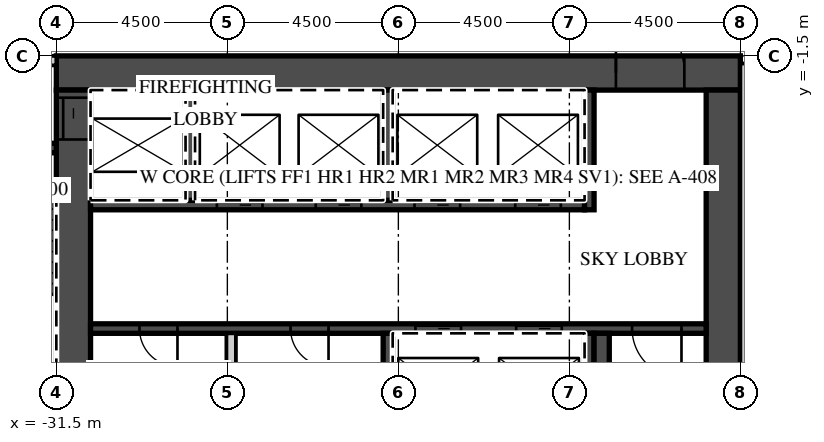
"""IFC4 building model, lengths in metres.
Left out: names, types, materials, properties, quantities, classifications, styles, units other than length and angle.
Written with IfcOpenShell. Run it as: python <this file> out.ifc"""

import sys

from ifc_helpers import new_model, si_unit, direction, frame, frame_2d, origin, place, context, subcontext, project, spatial, rectangle, extrude, element, fill, save


model = new_model("IFC4")
c1 = context("Model", 3, precision=1e-05, world=origin(), true_north=direction((0.0, 1.0)))
c2 = subcontext(c1, "Body", "Model", "MODEL_VIEW")
j1 = project(units=[si_unit("LENGTHUNIT", "METRE"), si_unit("PLANEANGLEUNIT", "RADIAN")], contexts=[c1])
p1 = place(None, origin())
s1 = spatial("IfcSite", under=j1, at=p1, CompositionType="ELEMENT")
p2 = place(p1, origin())
s2 = spatial("IfcBuilding", under=s1, at=p2, CompositionType="ELEMENT")
p3 = place(p2, frame((0.0, 0.0, 261.9)))
s3 = spatial("IfcBuildingStorey", under=s2, at=p3, CompositionType="ELEMENT", Elevation=261.9)
p4 = place(p3, frame((-31.5, -1.95, 0.0), z_axis=(0.0, 0.0, 1.0), x_axis=(1.0, 0.0, 0.0)))
e1 = element("IfcWall", 1, at=p4, inside=s3, PredefinedType="SHEAR", context=c2, shape_type="SweptSolid", body=[
    extrude(rectangle(XDim=18.0, YDim=0.9, at=frame_2d((9.0, 0.0))), origin(), (0.0, 0.0, 1.0), 6.32),
])
p5 = place(p4, frame((14.725, 0.0, 0.0)))
e2 = element("IfcOpeningElement", 2, at=p5, cuts=e1, PredefinedType="OPENING", context=c2, shape_type="SweptSolid", body=[
    extrude(rectangle(XDim=1.8, YDim=2.1, at=frame_2d((0.9, 1.05))), frame((0.0, 0.46, 0.0), z_axis=(0.0, -1.0, 0.0), x_axis=(1.0, 0.0, 0.0)), (0.0, 0.0, 1.0), 0.92),
])
p6 = place(p3, frame((-31.05, -15.2, 0.0), z_axis=(0.0, 0.0, 1.0), x_axis=(0.0, 1.0, 0.0)))
e3 = element("IfcWall", 3, at=p6, inside=s3, PredefinedType="SHEAR", context=c2, shape_type="SweptSolid", body=[
    extrude(rectangle(XDim=12.8, YDim=0.9, at=frame_2d((6.4, 0.0))), origin(), (0.0, 0.0, 1.0), 6.32),
])
p7 = place(p6, frame((11.5, 0.0, 0.0)))
e4 = element("IfcOpeningElement", 4, at=p7, cuts=e3, PredefinedType="OPENING", context=c2, shape_type="SweptSolid", body=[
    extrude(rectangle(XDim=1.1, YDim=2.1, at=frame_2d((0.55, 1.05))), frame((0.0, 0.46, 0.0), z_axis=(0.0, -1.0, 0.0), x_axis=(1.0, 0.0, 0.0)), (0.0, 0.0, 1.0), 0.92),
])
p8 = place(p3, frame((-13.95, -14.6, 0.0), z_axis=(0.0, 0.0, 1.0), x_axis=(0.0, 1.0, 0.0)))
e5 = element("IfcWall", 5, at=p8, inside=s3, PredefinedType="SHEAR", context=c2, shape_type="SweptSolid", body=[
    extrude(rectangle(XDim=12.2, YDim=0.9, at=frame_2d((6.1, 0.0))), origin(), (0.0, 0.0, 1.0), 6.32),
])
p9 = place(p3, frame((-30.6, -5.425, 0.0), z_axis=(0.0, 0.0, 1.0), x_axis=(1.0, 0.0, 0.0)))
e6 = element("IfcWall", 6, at=p9, inside=s3, PredefinedType="SHEAR", context=c2, shape_type="SweptSolid", body=[
    extrude(rectangle(XDim=13.0, YDim=0.25, at=frame_2d((6.5, 0.0))), origin(), (0.0, 0.0, 1.0), 6.32),
])
p10 = place(p9, frame((3.325, 0.0, 0.0)))
e7 = element("IfcOpeningElement", 7, at=p10, cuts=e6, PredefinedType="OPENING", context=c2, shape_type="SweptSolid", body=[
    extrude(rectangle(XDim=1.2, YDim=2.1, at=frame_2d((0.6, 1.05))), frame((0.0, 0.135, 0.0), z_axis=(0.0, -1.0, 0.0), x_axis=(1.0, 0.0, 0.0)), (0.0, 0.0, 1.0), 0.27),
])
p11 = place(p9, frame((5.925, 0.0, 0.0)))
e8 = element("IfcOpeningElement", 8, at=p11, cuts=e6, PredefinedType="OPENING", context=c2, shape_type="SweptSolid", body=[
    extrude(rectangle(XDim=1.2, YDim=2.1, at=frame_2d((0.6, 1.05))), frame((0.0, 0.135, 0.0), z_axis=(0.0, -1.0, 0.0), x_axis=(1.0, 0.0, 0.0)), (0.0, 0.0, 1.0), 0.27),
])
p12 = place(p9, frame((8.525, 0.0, 0.0)))
e9 = element("IfcOpeningElement", 9, at=p12, cuts=e6, PredefinedType="OPENING", context=c2, shape_type="SweptSolid", body=[
    extrude(rectangle(XDim=1.2, YDim=2.1, at=frame_2d((0.6, 1.05))), frame((0.0, 0.135, 0.0), z_axis=(0.0, -1.0, 0.0), x_axis=(1.0, 0.0, 0.0)), (0.0, 0.0, 1.0), 0.27),
])
p13 = place(p9, frame((11.175, 0.0, 0.0)))
e10 = element("IfcOpeningElement", 10, at=p13, cuts=e6, PredefinedType="OPENING", context=c2, shape_type="SweptSolid", body=[
    extrude(rectangle(XDim=1.2, YDim=2.1, at=frame_2d((0.6, 1.05))), frame((0.0, 0.135, 0.0), z_axis=(0.0, -1.0, 0.0), x_axis=(1.0, 0.0, 0.0)), (0.0, 0.0, 1.0), 0.27),
])
p14 = place(p3, frame((-17.475, -5.55, 0.0), z_axis=(0.0, 0.0, 1.0), x_axis=(0.0, 1.0, 0.0)))
e11 = element("IfcWall", 11, at=p14, inside=s3, PredefinedType="SHEAR", context=c2, shape_type="SweptSolid", body=[
    extrude(rectangle(XDim=3.15, YDim=0.25, at=frame_2d((1.575, 0.0))), origin(), (0.0, 0.0, 1.0), 6.32),
])
for number, where, z_axis, x_axis in (
    (12, (-27.975, -5.3, 0.0), (0.0, 0.0, 1.0), (0.0, 1.0, 0.0)),
    (13, (-22.775, -5.3, 0.0), (0.0, 0.0, 1.0), (0.0, 1.0, 0.0)),
):
    element("IfcWall", number, at=place(p3, frame(where, z_axis=z_axis, x_axis=x_axis)), inside=s3, PredefinedType="SHEAR", context=c2, shape_type="SweptSolid", body=[
        extrude(rectangle(XDim=2.9, YDim=0.25, at=frame_2d((1.45, 0.0))), origin(), (0.0, 0.0, 1.0), 6.32),
    ])
p15 = place(p3, frame((-30.6, -8.675, 0.0), z_axis=(0.0, 0.0, 1.0), x_axis=(1.0, 0.0, 0.0)))
e14 = element("IfcWall", 14, at=p15, inside=s3, PredefinedType="SHEAR", context=c2, shape_type="SweptSolid", body=[
    extrude(rectangle(XDim=16.2, YDim=0.25, at=frame_2d((8.1, 0.0))), origin(), (0.0, 0.0, 1.0), 6.32),
])
p16 = place(p15, frame((8.55, 0.0, 0.0)))
e15 = element("IfcOpeningElement", 15, at=p16, cuts=e14, PredefinedType="OPENING", context=c2, shape_type="SweptSolid", body=[
    extrude(rectangle(XDim=1.2, YDim=2.1, at=frame_2d((0.6, 1.05))), frame((0.0, 0.135, 0.0), z_axis=(0.0, -1.0, 0.0), x_axis=(1.0, 0.0, 0.0)), (0.0, 0.0, 1.0), 0.27),
])
p17 = place(p15, frame((11.2, 0.0, 0.0)))
e16 = element("IfcOpeningElement", 16, at=p17, cuts=e14, PredefinedType="OPENING", context=c2, shape_type="SweptSolid", body=[
    extrude(rectangle(XDim=1.2, YDim=2.1, at=frame_2d((0.6, 1.05))), frame((0.0, 0.135, 0.0), z_axis=(0.0, -1.0, 0.0), x_axis=(1.0, 0.0, 0.0)), (0.0, 0.0, 1.0), 0.27),
])
p18 = place(p15, frame((14.25, 0.0, 0.0)))
e17 = element("IfcOpeningElement", 17, at=p18, cuts=e14, PredefinedType="OPENING", context=c2, shape_type="SweptSolid", body=[
    extrude(rectangle(XDim=1.3, YDim=2.1, at=frame_2d((0.65, 1.05))), frame((0.0, 0.135, 0.0), z_axis=(0.0, -1.0, 0.0), x_axis=(1.0, 0.0, 0.0)), (0.0, 0.0, 1.0), 0.27),
])
p19 = place(p15, frame((1.288, 0.0, 0.0)))
e18 = element("IfcOpeningElement", 18, at=p19, cuts=e14, PredefinedType="OPENING", context=c2, shape_type="SweptSolid", body=[
    extrude(rectangle(XDim=1.0, YDim=2.1, at=frame_2d((0.5, 1.05))), frame((0.0, 0.135, 0.0), z_axis=(0.0, -1.0, 0.0), x_axis=(1.0, 0.0, 0.0)), (0.0, 0.0, 1.0), 0.27),
])
p20 = place(p15, frame((5.262, 0.0, 0.0)))
e19 = element("IfcOpeningElement", 19, at=p20, cuts=e14, PredefinedType="OPENING", context=c2, shape_type="SweptSolid", body=[
    extrude(rectangle(XDim=1.0, YDim=2.1, at=frame_2d((0.5, 1.05))), frame((0.0, 0.135, 0.0), z_axis=(0.0, -1.0, 0.0), x_axis=(1.0, 0.0, 0.0)), (0.0, 0.0, 1.0), 0.27),
])
for number, where, z_axis, x_axis in (
    (20, (-17.475, -11.7, 0.0), (0.0, 0.0, 1.0), (0.0, 1.0, 0.0)),
    (21, (-22.775, -11.7, 0.0), (0.0, 0.0, 1.0), (0.0, 1.0, 0.0)),
):
    element("IfcWall", number, at=place(p3, frame(where, z_axis=z_axis, x_axis=x_axis)), inside=s3, PredefinedType="SHEAR", context=c2, shape_type="SweptSolid", body=[
        extrude(rectangle(XDim=2.9, YDim=0.25, at=frame_2d((1.45, 0.0))), origin(), (0.0, 0.0, 1.0), 6.32),
    ])
p21 = place(p3, frame((-26.9, -11.7, 0.0), z_axis=(0.0, 0.0, 1.0), x_axis=(0.0, 1.0, 0.0)))
e22 = element("IfcWall", 22, at=p21, inside=s3, PredefinedType="PARTITIONING", context=c2, shape_type="SweptSolid", body=[
    extrude(rectangle(XDim=2.9, YDim=0.25, at=frame_2d((1.45, 0.0))), origin(), (0.0, 0.0, 1.0), 6.32),
])
p22 = place(p3, frame((-17.15, -14.6, 0.0), z_axis=(0.0, 0.0, 1.0), x_axis=(0.0, 1.0, 0.0)))
e23 = element("IfcWall", 23, at=p22, inside=s3, PredefinedType="SHEAR", context=c2, shape_type="SweptSolid", body=[
    extrude(rectangle(XDim=5.8, YDim=0.4, at=frame_2d((2.9, 0.0))), origin(), (0.0, 0.0, 1.0), 6.32),
])
p23 = place(p3, frame((-39.929, -1.625, 0.0), z_axis=(0.0, 0.0, 1.0), x_axis=(1.0, 0.0, 0.0)))
e24 = element("IfcWall", 24, at=p23, inside=s3, PredefinedType="PARTITIONING", context=c2, shape_type="SweptSolid", body=[
    extrude(rectangle(XDim=8.429, YDim=0.25, at=frame_2d((4.214, 0.0))), origin(), (0.0, 0.0, 1.0), 6.32),
])
p24 = place(p23, frame((6.504, 0.0, 0.0)))
e25 = element("IfcOpeningElement", 25, at=p24, cuts=e24, PredefinedType="OPENING", context=c2, shape_type="SweptSolid", body=[
    extrude(rectangle(XDim=1.3, YDim=2.1, at=frame_2d((0.65, 1.05))), frame((0.0, 0.135, 0.0), z_axis=(0.0, -1.0, 0.0), x_axis=(1.0, 0.0, 0.0)), (0.0, 0.0, 1.0), 0.27),
])
p25 = place(p23, frame((4.279, 0.0, 0.0)))
e26 = element("IfcOpeningElement", 26, at=p25, cuts=e24, PredefinedType="OPENING", context=c2, shape_type="SweptSolid", body=[
    extrude(rectangle(XDim=1.1, YDim=2.1, at=frame_2d((0.55, 1.05))), frame((0.0, 0.135, 0.0), z_axis=(0.0, -1.0, 0.0), x_axis=(1.0, 0.0, 0.0)), (0.0, 0.0, 1.0), 0.27),
])
p26 = place(p3, frame((-34.05, -3.925, 0.0), z_axis=(0.0, 0.0, 1.0), x_axis=(1.0, 0.0, 0.0)))
e27 = element("IfcWall", 27, at=p26, inside=s3, PredefinedType="SHEAR", context=c2, shape_type="SweptSolid", body=[
    extrude(rectangle(XDim=2.55, YDim=0.25, at=frame_2d((1.275, 0.0))), origin(), (0.0, 0.0, 1.0), 6.32),
])
p27 = place(p26, frame((0.625, 0.0, 0.0)))
e28 = element("IfcOpeningElement", 28, at=p27, cuts=e27, PredefinedType="OPENING", context=c2, shape_type="SweptSolid", body=[
    extrude(rectangle(XDim=1.3, YDim=2.1, at=frame_2d((0.65, 1.05))), frame((0.0, 0.135, 0.0), z_axis=(0.0, -1.0, 0.0), x_axis=(1.0, 0.0, 0.0)), (0.0, 0.0, 1.0), 0.27),
])
p28 = place(p3, frame((-13.4, -21.688, 0.0), z_axis=(0.0, 0.0, 1.0), x_axis=(0.0, 1.0, 0.0)))
e29 = element("IfcWall", 29, at=p28, inside=s3, PredefinedType="PARTITIONING", context=c2, shape_type="SweptSolid", body=[
    extrude(rectangle(XDim=19.988, YDim=0.2, at=frame_2d((9.994, 0.0))), origin(), (0.0, 0.0, 1.0), 6.32),
])
p29 = place(p16, origin())
e30 = element("IfcDoor", 30, at=p29, inside=s3, OperationType="SLIDING_TO_LEFT", PredefinedType="DOOR", context=c2, shape_type="SweptSolid", body=[
    extrude(rectangle(XDim=1.2, YDim=2.1, at=frame_2d((0.6, 1.05))), frame((0.0, 0.025, 0.0), z_axis=(0.0, -1.0, 0.0), x_axis=(1.0, 0.0, 0.0)), (0.0, 0.0, 1.0), 0.05),
])
fill(e15, e30)
p30 = place(p17, origin())
e31 = element("IfcDoor", 31, at=p30, inside=s3, OperationType="SLIDING_TO_RIGHT", PredefinedType="DOOR", context=c2, shape_type="SweptSolid", body=[
    extrude(rectangle(XDim=1.2, YDim=2.1, at=frame_2d((0.6, 1.05))), frame((0.0, 0.025, 0.0), z_axis=(0.0, -1.0, 0.0), x_axis=(1.0, 0.0, 0.0)), (0.0, 0.0, 1.0), 0.05),
])
fill(e16, e31)
p31 = place(p10, origin())
e32 = element("IfcDoor", 32, at=p31, inside=s3, OperationType="SLIDING_TO_RIGHT", PredefinedType="DOOR", context=c2, shape_type="SweptSolid", body=[
    extrude(rectangle(XDim=1.2, YDim=2.1, at=frame_2d((0.6, 1.05))), frame((0.0, 0.025, 0.0), z_axis=(0.0, -1.0, 0.0), x_axis=(1.0, 0.0, 0.0)), (0.0, 0.0, 1.0), 0.05),
])
fill(e7, e32)
p32 = place(p11, origin())
e33 = element("IfcDoor", 33, at=p32, inside=s3, OperationType="SLIDING_TO_RIGHT", PredefinedType="DOOR", context=c2, shape_type="SweptSolid", body=[
    extrude(rectangle(XDim=1.2, YDim=2.1, at=frame_2d((0.6, 1.05))), frame((0.0, 0.025, 0.0), z_axis=(0.0, -1.0, 0.0), x_axis=(1.0, 0.0, 0.0)), (0.0, 0.0, 1.0), 0.05),
])
fill(e8, e33)
p33 = place(p12, origin())
e34 = element("IfcDoor", 34, at=p33, inside=s3, OperationType="SLIDING_TO_LEFT", PredefinedType="DOOR", context=c2, shape_type="SweptSolid", body=[
    extrude(rectangle(XDim=1.2, YDim=2.1, at=frame_2d((0.6, 1.05))), frame((0.0, 0.025, 0.0), z_axis=(0.0, -1.0, 0.0), x_axis=(1.0, 0.0, 0.0)), (0.0, 0.0, 1.0), 0.05),
])
fill(e9, e34)
p34 = place(p13, origin())
e35 = element("IfcDoor", 35, at=p34, inside=s3, OperationType="SLIDING_TO_RIGHT", PredefinedType="DOOR", context=c2, shape_type="SweptSolid", body=[
    extrude(rectangle(XDim=1.2, YDim=2.1, at=frame_2d((0.6, 1.05))), frame((0.0, 0.025, 0.0), z_axis=(0.0, -1.0, 0.0), x_axis=(1.0, 0.0, 0.0)), (0.0, 0.0, 1.0), 0.05),
])
fill(e10, e35)
p35 = place(p7, origin())
e36 = element("IfcDoor", 36, at=p35, inside=s3, OperationType="SLIDING_TO_RIGHT", PredefinedType="DOOR", context=c2, shape_type="SweptSolid", body=[
    extrude(rectangle(XDim=1.1, YDim=2.1, at=frame_2d((0.55, 1.05))), frame((0.0, 0.025, 0.0), z_axis=(0.0, -1.0, 0.0), x_axis=(1.0, 0.0, 0.0)), (0.0, 0.0, 1.0), 0.05),
])
fill(e4, e36)
p36 = place(p5, origin())
e37 = element("IfcDoor", 37, at=p36, inside=s3, OperationType="DOUBLE_DOOR_DOUBLE_SWING", PredefinedType="DOOR", context=c2, shape_type="SweptSolid", body=[
    extrude(rectangle(XDim=1.8, YDim=2.1, at=frame_2d((0.9, 1.05))), frame((0.0, 0.025, 0.0), z_axis=(0.0, -1.0, 0.0), x_axis=(1.0, 0.0, 0.0)), (0.0, 0.0, 1.0), 0.05),
])
fill(e2, e37)
p37 = place(p18, origin())
e38 = element("IfcDoor", 38, at=p37, inside=s3, OperationType="SINGLE_SWING_RIGHT", PredefinedType="DOOR", context=c2, shape_type="SweptSolid", body=[
    extrude(rectangle(XDim=1.3, YDim=2.1, at=frame_2d((0.65, 1.05))), frame((0.0, 0.025, 0.0), z_axis=(0.0, -1.0, 0.0), x_axis=(1.0, 0.0, 0.0)), (0.0, 0.0, 1.0), 0.05),
])
fill(e17, e38)
p38 = place(p19, origin())
e39 = element("IfcDoor", 39, at=p38, inside=s3, OperationType="SINGLE_SWING_RIGHT", PredefinedType="DOOR", context=c2, shape_type="SweptSolid", body=[
    extrude(rectangle(XDim=1.0, YDim=2.1, at=frame_2d((0.5, 1.05))), frame((0.0, 0.025, 0.0), z_axis=(0.0, -1.0, 0.0), x_axis=(1.0, 0.0, 0.0)), (0.0, 0.0, 1.0), 0.05),
])
fill(e18, e39)
p39 = place(p20, origin())
e40 = element("IfcDoor", 40, at=p39, inside=s3, OperationType="SINGLE_SWING_RIGHT", PredefinedType="DOOR", context=c2, shape_type="SweptSolid", body=[
    extrude(rectangle(XDim=1.0, YDim=2.1, at=frame_2d((0.5, 1.05))), frame((0.0, 0.025, 0.0), z_axis=(0.0, -1.0, 0.0), x_axis=(1.0, 0.0, 0.0)), (0.0, 0.0, 1.0), 0.05),
])
fill(e19, e40)
save(model, sys.argv[1])
